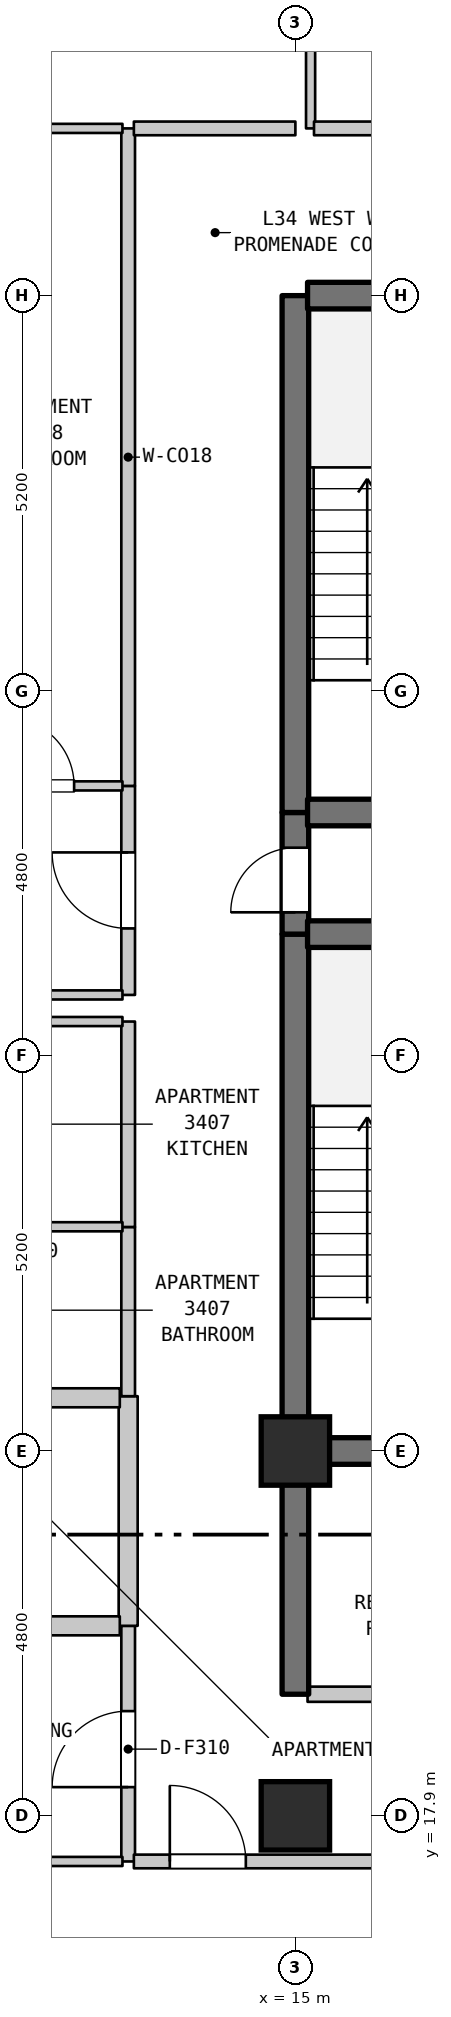
"""IFC4 building model, lengths in metres.
Left out: names, types, materials, properties, quantities, classifications, styles, units other than length and angle.
Written with IfcOpenShell. Run it as: python <this file> out.ifc"""

import sys

from ifc_helpers import new_model, si_unit, direction, frame, frame_2d, origin, origin_2d, place, context, subcontext, project, spatial, rectangle, extrude, element, fill, save


model = new_model("IFC4")
c1 = context("Model", 3, precision=1e-05, world=origin(), true_north=direction((0.0, 1.0)))
c2 = subcontext(c1, "Body", "Model", "MODEL_VIEW")
j1 = project(units=[si_unit("LENGTHUNIT", "METRE"), si_unit("PLANEANGLEUNIT", "RADIAN")], contexts=[c1])
p1 = place(None, origin())
s1 = spatial("IfcSite", under=j1, at=p1, CompositionType="ELEMENT")
p2 = place(p1, origin())
s2 = spatial("IfcBuilding", under=s1, at=p2, CompositionType="ELEMENT")
p3 = place(p2, frame((0.0, 0.0, 140.9)))
s3 = spatial("IfcBuildingStorey", under=s2, at=p3, CompositionType="ELEMENT", Elevation=140.9)
for number, where, z_axis, x_axis in (
    (1, (15.0, 17.9, 0.0), (0.0, 0.0, 1.0), (1.0, 0.0, 0.0)),
    (2, (15.0, 22.7, 0.0), (0.0, 0.0, 1.0), (1.0, 0.0, 0.0)),
):
    element("IfcColumn", number, at=place(p3, frame(where, z_axis=z_axis, x_axis=x_axis)), inside=s3, PredefinedType="COLUMN", context=c2, shape_type="SweptSolid", body=[
        extrude(rectangle(XDim=0.9, YDim=0.9, at=origin_2d()), origin(), (0.0, 0.0, 1.0), 3.7),
    ])
p4 = place(p3, frame((12.8, 17.3, 0.0), z_axis=(0.0, 0.0, 1.0), x_axis=(0.0, 1.0, 0.0)))
e3 = element("IfcWall", 3, at=p4, inside=s3, PredefinedType="STANDARD", context=c2, shape_type="SweptSolid", body=[
    extrude(rectangle(XDim=3.1, YDim=0.18, at=frame_2d((1.55, 0.0))), origin(), (0.0, 0.0, 1.0), 3.385),
])
p5 = place(p4, frame((0.978, 0.0, 0.0)))
e4 = element("IfcOpeningElement", 4, at=p5, cuts=e3, PredefinedType="OPENING", context=c2, shape_type="SweptSolid", body=[
    extrude(rectangle(XDim=1.0, YDim=2.15, at=frame_2d((0.5, 1.075))), frame((0.0, 0.1, 0.0), z_axis=(0.0, -1.0, 0.0), x_axis=(1.0, 0.0, 0.0)), (0.0, 0.0, 1.0), 0.2),
])
p6 = place(p3, frame((12.8, 20.4, 0.0), z_axis=(0.0, 0.0, 1.0), x_axis=(0.0, 1.0, 0.0)))
e5 = element("IfcWall", 5, at=p6, inside=s3, PredefinedType="STANDARD", context=c2, shape_type="SweptSolid", body=[
    extrude(rectangle(XDim=3.021, YDim=0.25, at=frame_2d((1.51, 0.0))), origin(), (0.0, 0.0, 1.0), 3.385),
])
p7 = place(p3, frame((12.8, 23.421, 0.0), z_axis=(0.0, 0.0, 1.0), x_axis=(0.0, 1.0, 0.0)))
e6 = element("IfcWall", 6, at=p7, inside=s3, PredefinedType="STANDARD", context=c2, shape_type="SweptSolid", body=[
    extrude(rectangle(XDim=2.226, YDim=0.18, at=frame_2d((1.113, 0.0))), origin(), (0.0, 0.0, 1.0), 3.385),
])
p8 = place(p3, frame((12.8, 25.647, 0.0), z_axis=(0.0, 0.0, 1.0), x_axis=(0.0, 1.0, 0.0)))
e7 = element("IfcWall", 7, at=p8, inside=s3, PredefinedType="STANDARD", context=c2, shape_type="SweptSolid", body=[
    extrude(rectangle(XDim=2.703, YDim=0.18, at=frame_2d((1.352, 0.0))), origin(), (0.0, 0.0, 1.0), 3.385),
])
p9 = place(p3, frame((12.8, 28.7, 0.0), z_axis=(0.0, 0.0, 1.0), x_axis=(0.0, 1.0, 0.0)))
e8 = element("IfcWall", 8, at=p9, inside=s3, PredefinedType="STANDARD", context=c2, shape_type="SweptSolid", body=[
    extrude(rectangle(XDim=2.75, YDim=0.18, at=frame_2d((1.375, 0.0))), origin(), (0.0, 0.0, 1.0), 3.385),
])
p10 = place(p9, frame((0.875, 0.0, 0.0)))
e9 = element("IfcOpeningElement", 9, at=p10, cuts=e8, PredefinedType="OPENING", context=c2, shape_type="SweptSolid", body=[
    extrude(rectangle(XDim=1.0, YDim=2.15, at=frame_2d((0.5, 1.075))), frame((0.0, 0.1, 0.0), z_axis=(0.0, -1.0, 0.0), x_axis=(1.0, 0.0, 0.0)), (0.0, 0.0, 1.0), 0.2),
])
p11 = place(p3, frame((12.8, 31.45, 0.0), z_axis=(0.0, 0.0, 1.0), x_axis=(0.0, 1.0, 0.0)))
e10 = element("IfcWall", 10, at=p11, inside=s3, PredefinedType="STANDARD", context=c2, shape_type="SweptSolid", body=[
    extrude(rectangle(XDim=8.65, YDim=0.18, at=frame_2d((4.325, 0.0))), origin(), (0.0, 0.0, 1.0), 3.385),
])
p12 = place(p3, frame((15.0, 19.5, 0.0), z_axis=(0.0, 0.0, 1.0), x_axis=(0.0, 1.0, 0.0)))
e11 = element("IfcWall", 11, at=p12, inside=s3, PredefinedType="SHEAR", context=c2, shape_type="SweptSolid", body=[
    extrude(rectangle(XDim=3.2, YDim=0.35, at=frame_2d((1.6, 0.0))), origin(), (0.0, 0.0, 1.0), 3.385),
])
p13 = place(p3, frame((15.0, 22.7, 0.0), z_axis=(0.0, 0.0, 1.0), x_axis=(0.0, 1.0, 0.0)))
e12 = element("IfcWall", 12, at=p13, inside=s3, PredefinedType="SHEAR", context=c2, shape_type="SweptSolid", body=[
    extrude(rectangle(XDim=6.8, YDim=0.35, at=frame_2d((3.4, 0.0))), origin(), (0.0, 0.0, 1.0), 3.385),
])
p14 = place(p3, frame((15.0, 29.5, 0.0), z_axis=(0.0, 0.0, 1.0), x_axis=(0.0, 1.0, 0.0)))
e13 = element("IfcWall", 13, at=p14, inside=s3, PredefinedType="SHEAR", context=c2, shape_type="SweptSolid", body=[
    extrude(rectangle(XDim=1.6, YDim=0.35, at=frame_2d((0.8, 0.0))), origin(), (0.0, 0.0, 1.0), 3.385),
])
p15 = place(p14, frame((0.287, 0.0, 0.0)))
e14 = element("IfcOpeningElement", 14, at=p15, cuts=e13, PredefinedType="OPENING", context=c2, shape_type="SweptSolid", body=[
    extrude(rectangle(XDim=0.85, YDim=2.1, at=frame_2d((0.425, 1.05))), frame((0.0, 0.185, 0.0), z_axis=(0.0, -1.0, 0.0), x_axis=(1.0, 0.0, 0.0)), (0.0, 0.0, 1.0), 0.37),
])
p16 = place(p3, frame((15.0, 31.1, 0.0), z_axis=(0.0, 0.0, 1.0), x_axis=(0.0, 1.0, 0.0)))
e15 = element("IfcWall", 15, at=p16, inside=s3, PredefinedType="SHEAR", context=c2, shape_type="SweptSolid", body=[
    extrude(rectangle(XDim=6.8, YDim=0.35, at=frame_2d((3.4, 0.0))), origin(), (0.0, 0.0, 1.0), 3.385),
])
p17 = place(p3, frame((15.2, 40.1, 0.0), z_axis=(0.0, 0.0, 1.0), x_axis=(0.0, 1.0, 0.0)))
e16 = element("IfcWall", 16, at=p17, inside=s3, PredefinedType="PARTITIONING", context=c2, shape_type="SweptSolid", body=[
    extrude(rectangle(XDim=3.2, YDim=0.12, at=frame_2d((1.6, 0.0))), origin(), (0.0, 0.0, 1.0), 3.385),
])
p18 = place(p3, frame((9.085, 17.3, 0.0), z_axis=(0.0, 0.0, 1.0), x_axis=(1.0, 0.0, 0.0)))
e17 = element("IfcWall", 17, at=p18, inside=s3, PredefinedType="PARTITIONING", context=c2, shape_type="SweptSolid", body=[
    extrude(rectangle(XDim=3.64, YDim=0.12, at=frame_2d((1.82, 0.0))), origin(), (0.0, 0.0, 1.0), 3.385),
])
p19 = place(p3, frame((12.875, 17.3, 0.0), z_axis=(0.0, 0.0, 1.0), x_axis=(1.0, 0.0, 0.0)))
e18 = element("IfcWall", 18, at=p19, inside=s3, PredefinedType="STANDARD", context=c2, shape_type="SweptSolid", body=[
    extrude(rectangle(XDim=3.58, YDim=0.18, at=frame_2d((1.79, 0.0))), origin(), (0.0, 0.0, 1.0), 3.385),
])
p20 = place(p19, frame((0.473, 0.0, 0.0)))
e19 = element("IfcOpeningElement", 19, at=p20, cuts=e18, PredefinedType="OPENING", context=c2, shape_type="SweptSolid", body=[
    extrude(rectangle(XDim=1.0, YDim=2.15, at=frame_2d((0.5, 1.075))), frame((0.0, 0.1, 0.0), z_axis=(0.0, -1.0, 0.0), x_axis=(1.0, 0.0, 0.0)), (0.0, 0.0, 1.0), 0.2),
])
p21 = place(p3, frame((15.16, 19.5, 0.0), z_axis=(0.0, 0.0, 1.0), x_axis=(1.0, 0.0, 0.0)))
e20 = element("IfcWall", 20, at=p21, inside=s3, PredefinedType="STANDARD", context=c2, shape_type="SweptSolid", body=[
    extrude(rectangle(XDim=3.68, YDim=0.2, at=frame_2d((1.84, 0.0))), origin(), (0.0, 0.0, 1.0), 3.385),
])
p22 = place(p21, frame((1.39, 0.0, 0.0)))
e21 = element("IfcOpeningElement", 21, at=p22, cuts=e20, PredefinedType="OPENING", context=c2, shape_type="SweptSolid", body=[
    extrude(rectangle(XDim=0.9, YDim=2.15, at=frame_2d((0.45, 1.075))), frame((0.0, 0.11, 0.0), z_axis=(0.0, -1.0, 0.0), x_axis=(1.0, 0.0, 0.0)), (0.0, 0.0, 1.0), 0.22),
])
p23 = place(p3, frame((10.66, 20.4, 0.0), z_axis=(0.0, 0.0, 1.0), x_axis=(1.0, 0.0, 0.0)))
e22 = element("IfcWall", 22, at=p23, inside=s3, PredefinedType="STANDARD", context=c2, shape_type="SweptSolid", body=[
    extrude(rectangle(XDim=2.03, YDim=0.25, at=frame_2d((1.015, 0.0))), origin(), (0.0, 0.0, 1.0), 3.385),
])
p24 = place(p3, frame((15.16, 22.7, 0.0), z_axis=(0.0, 0.0, 1.0), x_axis=(1.0, 0.0, 0.0)))
e23 = element("IfcWall", 23, at=p24, inside=s3, PredefinedType="SHEAR", context=c2, shape_type="SweptSolid", body=[
    extrude(rectangle(XDim=3.68, YDim=0.35, at=frame_2d((1.84, 0.0))), origin(), (0.0, 0.0, 1.0), 3.385),
])
p25 = place(p3, frame((10.66, 23.4, 0.0), z_axis=(0.0, 0.0, 1.0), x_axis=(1.0, 0.0, 0.0)))
e24 = element("IfcWall", 24, at=p25, inside=s3, PredefinedType="STANDARD", context=c2, shape_type="SweptSolid", body=[
    extrude(rectangle(XDim=2.03, YDim=0.25, at=frame_2d((1.015, 0.0))), origin(), (0.0, 0.0, 1.0), 3.385),
])
for number, where, z_axis, x_axis in (
    (25, (10.595, 25.65, 0.0), (0.0, 0.0, 1.0), (1.0, 0.0, 0.0)),
    (26, (10.595, 28.35, 0.0), (0.0, 0.0, 1.0), (1.0, 0.0, 0.0)),
):
    element("IfcWall", number, at=place(p3, frame(where, z_axis=z_axis, x_axis=x_axis)), inside=s3, PredefinedType="PARTITIONING", context=c2, shape_type="SweptSolid", body=[
        extrude(rectangle(XDim=2.13, YDim=0.12, at=frame_2d((1.065, 0.0))), origin(), (0.0, 0.0, 1.0), 3.385),
    ])
p26 = place(p3, frame((9.03, 28.7, 0.0), z_axis=(0.0, 0.0, 1.0), x_axis=(1.0, 0.0, 0.0)))
e27 = element("IfcWall", 27, at=p26, inside=s3, PredefinedType="PARTITIONING", context=c2, shape_type="SweptSolid", body=[
    extrude(rectangle(XDim=3.695, YDim=0.12, at=frame_2d((1.848, 0.0))), origin(), (0.0, 0.0, 1.0), 3.385),
])
for number, where, z_axis, x_axis in (
    (28, (15.16, 29.5, 0.0), (0.0, 0.0, 1.0), (1.0, 0.0, 0.0)),
    (29, (15.16, 31.1, 0.0), (0.0, 0.0, 1.0), (1.0, 0.0, 0.0)),
):
    element("IfcWall", number, at=place(p3, frame(where, z_axis=z_axis, x_axis=x_axis)), inside=s3, PredefinedType="SHEAR", context=c2, shape_type="SweptSolid", body=[
        extrude(rectangle(XDim=3.68, YDim=0.35, at=frame_2d((1.84, 0.0))), origin(), (0.0, 0.0, 1.0), 3.385),
    ])
p27 = place(p3, frame((10.523, 31.45, 0.0), z_axis=(0.0, 0.0, 1.0), x_axis=(1.0, 0.0, 0.0)))
e30 = element("IfcWall", 30, at=p27, inside=s3, PredefinedType="PARTITIONING", context=c2, shape_type="SweptSolid", body=[
    extrude(rectangle(XDim=2.202, YDim=0.12, at=frame_2d((1.101, 0.0))), origin(), (0.0, 0.0, 1.0), 3.385),
])
p28 = place(p27, frame((0.666, 0.0, 0.0)))
e31 = element("IfcOpeningElement", 31, at=p28, cuts=e30, PredefinedType="OPENING", context=c2, shape_type="SweptSolid", body=[
    extrude(rectangle(XDim=0.9, YDim=2.1, at=frame_2d((0.45, 1.05))), frame((0.0, 0.07, 0.0), z_axis=(0.0, -1.0, 0.0), x_axis=(1.0, 0.0, 0.0)), (0.0, 0.0, 1.0), 0.14),
])
p29 = place(p3, frame((15.16, 37.9, 0.0), z_axis=(0.0, 0.0, 1.0), x_axis=(1.0, 0.0, 0.0)))
e32 = element("IfcWall", 32, at=p29, inside=s3, PredefinedType="SHEAR", context=c2, shape_type="SweptSolid", body=[
    extrude(rectangle(XDim=3.68, YDim=0.35, at=frame_2d((1.84, 0.0))), origin(), (0.0, 0.0, 1.0), 3.385),
])
p30 = place(p3, frame((10.523, 40.1, 0.0), z_axis=(0.0, 0.0, 1.0), x_axis=(1.0, 0.0, 0.0)))
e33 = element("IfcWall", 33, at=p30, inside=s3, PredefinedType="PARTITIONING", context=c2, shape_type="SweptSolid", body=[
    extrude(rectangle(XDim=2.202, YDim=0.12, at=frame_2d((1.101, 0.0))), origin(), (0.0, 0.0, 1.0), 3.385),
])
p31 = place(p3, frame((12.875, 40.1, 0.0), z_axis=(0.0, 0.0, 1.0), x_axis=(1.0, 0.0, 0.0)))
e34 = element("IfcWall", 34, at=p31, inside=s3, PredefinedType="STANDARD", context=c2, shape_type="SweptSolid", body=[
    extrude(rectangle(XDim=2.125, YDim=0.18, at=frame_2d((1.062, 0.0))), origin(), (0.0, 0.0, 1.0), 3.385),
])
p32 = place(p3, frame((15.245, 40.1, 0.0), z_axis=(0.0, 0.0, 1.0), x_axis=(1.0, 0.0, 0.0)))
e35 = element("IfcWall", 35, at=p32, inside=s3, PredefinedType="STANDARD", context=c2, shape_type="SweptSolid", body=[
    extrude(rectangle(XDim=2.61, YDim=0.18, at=frame_2d((1.305, 0.0))), origin(), (0.0, 0.0, 1.0), 3.385),
])
p33 = place(p5, origin())
e36 = element("IfcDoor", 36, at=p33, inside=s3, OperationType="SINGLE_SWING_LEFT", PredefinedType="DOOR", context=c2, shape_type="SweptSolid", body=[
    extrude(rectangle(XDim=1.0, YDim=2.15, at=frame_2d((0.5, 1.075))), frame((0.0, 0.025, 0.0), z_axis=(0.0, -1.0, 0.0), x_axis=(1.0, 0.0, 0.0)), (0.0, 0.0, 1.0), 0.05),
])
fill(e4, e36)
p34 = place(p10, origin())
e37 = element("IfcDoor", 37, at=p34, inside=s3, OperationType="SINGLE_SWING_RIGHT", PredefinedType="DOOR", context=c2, shape_type="SweptSolid", body=[
    extrude(rectangle(XDim=1.0, YDim=2.15, at=frame_2d((0.5, 1.075))), frame((0.0, 0.025, 0.0), z_axis=(0.0, -1.0, 0.0), x_axis=(1.0, 0.0, 0.0)), (0.0, 0.0, 1.0), 0.05),
])
fill(e9, e37)
p35 = place(p15, origin())
e38 = element("IfcDoor", 38, at=p35, inside=s3, OperationType="SINGLE_SWING_LEFT", PredefinedType="DOOR", context=c2, shape_type="SweptSolid", body=[
    extrude(rectangle(XDim=0.85, YDim=2.1, at=frame_2d((0.425, 1.05))), frame((0.0, 0.025, 0.0), z_axis=(0.0, -1.0, 0.0), x_axis=(1.0, 0.0, 0.0)), (0.0, 0.0, 1.0), 0.05),
])
fill(e14, e38)
p36 = place(p20, origin())
e39 = element("IfcDoor", 39, at=p36, inside=s3, OperationType="SINGLE_SWING_LEFT", PredefinedType="DOOR", context=c2, shape_type="SweptSolid", body=[
    extrude(rectangle(XDim=1.0, YDim=2.15, at=frame_2d((0.5, 1.075))), frame((0.0, 0.025, 0.0), z_axis=(0.0, -1.0, 0.0), x_axis=(1.0, 0.0, 0.0)), (0.0, 0.0, 1.0), 0.05),
])
fill(e19, e39)
p37 = place(p28, origin())
e40 = element("IfcDoor", 40, at=p37, inside=s3, OperationType="SINGLE_SWING_LEFT", PredefinedType="DOOR", context=c2, shape_type="SweptSolid", body=[
    extrude(rectangle(XDim=0.9, YDim=2.1, at=frame_2d((0.45, 1.05))), frame((0.0, 0.025, 0.0), z_axis=(0.0, -1.0, 0.0), x_axis=(1.0, 0.0, 0.0)), (0.0, 0.0, 1.0), 0.05),
])
fill(e31, e40)
save(model, sys.argv[1])
